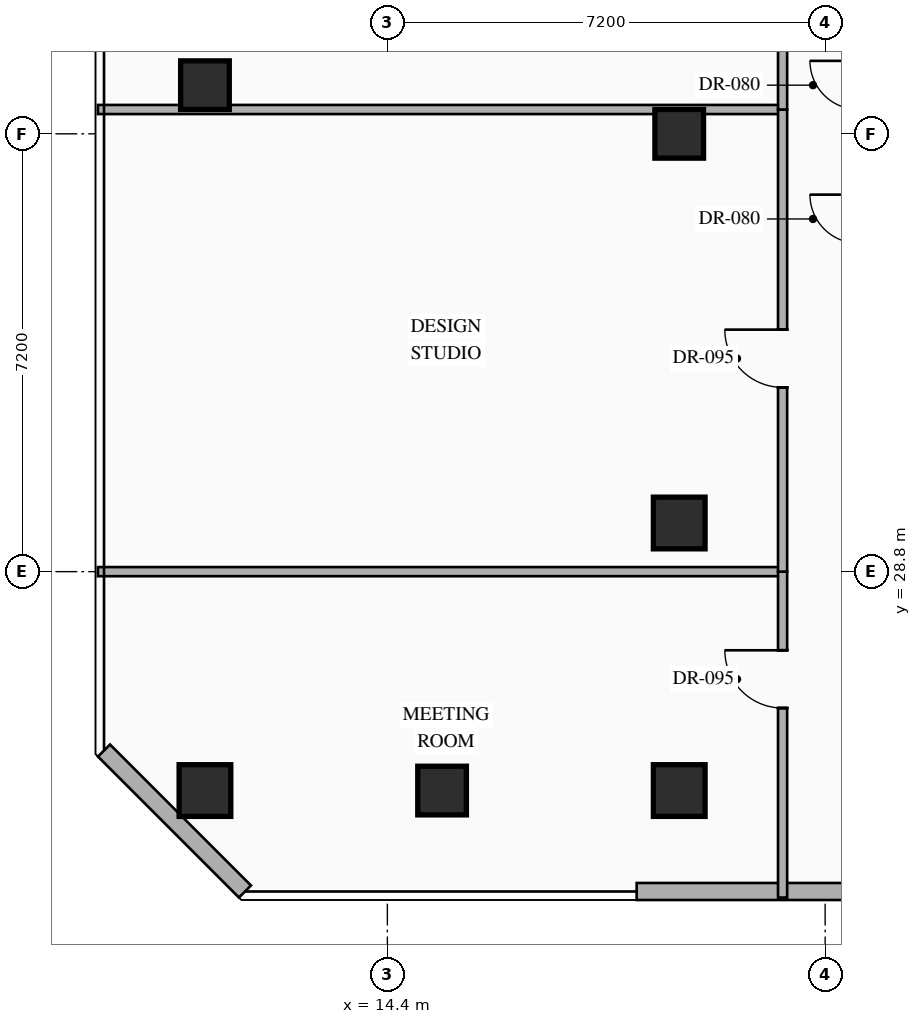
"""IFC4 building model, lengths in metres.
Left out: names, types, materials, properties, quantities, classifications, styles, units other than length and angle.
Written with IfcOpenShell. Run it as: python <this file> out.ifc"""

import sys

from ifc_helpers import new_model, si_unit, direction, frame, frame_2d, origin, origin_2d, place, context, subcontext, project, spatial, rectangle, hollow_rectangle, extrude, element, fill, save


model = new_model("IFC4")
c1 = context("Model", 3, precision=1e-05, world=origin(), true_north=direction((0.0, 1.0)))
c2 = subcontext(c1, "Body", "Model", "MODEL_VIEW")
j1 = project(units=[si_unit("LENGTHUNIT", "METRE"), si_unit("PLANEANGLEUNIT", "RADIAN")], contexts=[c1])
p1 = place(None, origin())
s1 = spatial("IfcSite", under=j1, at=p1, CompositionType="ELEMENT")
p2 = place(p1, origin())
s2 = spatial("IfcBuilding", under=s1, at=p2, CompositionType="ELEMENT")
p3 = place(p2, frame((0.0, 0.0, 142.05)))
s3 = spatial("IfcBuildingStorey", under=s2, at=p3, CompositionType="ELEMENT", Elevation=142.05)
for number, where, z_axis, x_axis in (
    (1, (11.4, 25.2, 0.0), (0.0, 0.0, 1.0), (1.0, 0.0, 0.0)),
    (2, (19.2, 25.2, 0.0), (0.0, 0.0, 1.0), (1.0, 0.0, 0.0)),
    (3, (19.2, 29.6, 0.0), (0.0, 0.0, 1.0), (1.0, 0.0, 0.0)),
):
    element("IfcColumn", number, at=place(p3, frame(where, z_axis=z_axis, x_axis=x_axis)), inside=s3, PredefinedType="COLUMN", context=c2, shape_type="SweptSolid", body=[
        extrude(hollow_rectangle(XDim=0.85, YDim=0.85, WallThickness=0.032, at=origin_2d()), origin(), (0.0, 0.0, 1.0), 3.6),
    ])
for number, where, z_axis, x_axis in (
    (4, (11.4, 36.8, 0.0), (0.0, 0.0, 1.0), (1.0, 0.0, 0.0)),
    (5, (19.2, 36.0, 0.0), (0.0, 0.0, 1.0), (1.0, 0.0, 0.0)),
    (6, (15.3, 25.2, 0.0), (0.0, 0.0, 1.0), (1.0, 0.0, 0.0)),
):
    element("IfcColumn", number, at=place(p3, frame(where, z_axis=z_axis, x_axis=x_axis)), inside=s3, PredefinedType="COLUMN", context=c2, shape_type="SweptSolid", body=[
        extrude(hollow_rectangle(XDim=0.8, YDim=0.8, WallThickness=0.032, at=origin_2d()), origin(), (0.0, 0.0, 1.0), 3.6),
    ])
p4 = place(p3, frame((25.247, 23.54, 0.0), z_axis=(0.0, 0.0, 1.0), x_axis=(-1.0, 0.0, 0.0)))
e7 = element("IfcWall", 7, at=p4, inside=s3, PredefinedType="STANDARD", context=c2, shape_type="SweptSolid", body=[
    extrude(rectangle(XDim=6.747, YDim=0.28, at=frame_2d((3.374, 0.0))), origin(), (0.0, 0.0, 1.0), 3.35),
])
p5 = place(p3, frame((12.058, 23.54, 0.0), z_axis=(0.0, 0.0, 1.0), x_axis=(-0.707144017911, 0.707069542501, 0.0)))
e8 = element("IfcWall", 8, at=p5, inside=s3, PredefinedType="STANDARD", context=c2, shape_type="SweptSolid", body=[
    extrude(rectangle(XDim=3.278, YDim=0.28, at=frame_2d((1.639, 0.0))), origin(), (0.0, 0.0, 1.0), 3.35),
])
p6 = place(p3, frame((9.64, 28.8, 0.0), z_axis=(0.0, 0.0, 1.0), x_axis=(1.0, 0.0, 0.0)))
e9 = element("IfcWall", 9, at=p6, inside=s3, PredefinedType="PARTITIONING", context=c2, shape_type="SweptSolid", body=[
    extrude(rectangle(XDim=11.26, YDim=0.15, at=frame_2d((5.63, 0.0))), origin(), (0.0, 0.0, 1.0), 3.35),
])
p7 = place(p3, frame((20.9, 23.44, 0.0), z_axis=(0.0, 0.0, 1.0), x_axis=(0.0, 1.0, 0.0)))
e10 = element("IfcWall", 10, at=p7, inside=s3, PredefinedType="PARTITIONING", context=c2, shape_type="SweptSolid", body=[
    extrude(rectangle(XDim=5.36, YDim=0.15, at=frame_2d((2.68, 0.0))), origin(), (0.0, 0.0, 1.0), 3.35),
])
p8 = place(p7, frame((3.117, 0.0, 0.0)))
e11 = element("IfcOpeningElement", 11, at=p8, cuts=e10, PredefinedType="OPENING", context=c2, shape_type="SweptSolid", body=[
    extrude(rectangle(XDim=0.95, YDim=2.15, at=frame_2d((0.475, 1.075))), frame((0.0, 0.085, 0.0), z_axis=(0.0, -1.0, 0.0), x_axis=(1.0, 0.0, 0.0)), (0.0, 0.0, 1.0), 0.17),
])
p9 = place(p3, frame((9.64, 36.4, 0.0), z_axis=(0.0, 0.0, 1.0), x_axis=(1.0, 0.0, 0.0)))
e12 = element("IfcWall", 12, at=p9, inside=s3, PredefinedType="PARTITIONING", context=c2, shape_type="SweptSolid", body=[
    extrude(rectangle(XDim=11.26, YDim=0.15, at=frame_2d((5.63, 0.0))), origin(), (0.0, 0.0, 1.0), 2.695),
])
p10 = place(p3, frame((20.9, 28.8, 0.0), z_axis=(0.0, 0.0, 1.0), x_axis=(0.0, 1.0, 0.0)))
e13 = element("IfcWall", 13, at=p10, inside=s3, PredefinedType="PARTITIONING", context=c2, shape_type="SweptSolid", body=[
    extrude(rectangle(XDim=7.6, YDim=0.15, at=frame_2d((3.8, 0.0))), origin(), (0.0, 0.0, 1.0), 3.35),
])
p11 = place(p10, frame((3.03, 0.0, 0.0)))
e14 = element("IfcOpeningElement", 14, at=p11, cuts=e13, PredefinedType="OPENING", context=c2, shape_type="SweptSolid", body=[
    extrude(rectangle(XDim=0.95, YDim=2.15, at=frame_2d((0.475, 1.075))), frame((0.0, 0.085, 0.0), z_axis=(0.0, -1.0, 0.0), x_axis=(1.0, 0.0, 0.0)), (0.0, 0.0, 1.0), 0.17),
])
p12 = place(p3, frame((20.9, 36.4, 0.0), z_axis=(0.0, 0.0, 1.0), x_axis=(0.0, 1.0, 0.0)))
e15 = element("IfcWall", 15, at=p12, inside=s3, PredefinedType="PARTITIONING", context=c2, shape_type="SweptSolid", body=[
    extrude(rectangle(XDim=7.6, YDim=0.15, at=frame_2d((3.8, 0.0))), origin(), (0.0, 0.0, 1.0), 3.35),
])
p13 = place(p12, frame((4.503, 0.0, 0.0)))
e16 = element("IfcOpeningElement", 16, at=p13, cuts=e15, PredefinedType="OPENING", context=c2, shape_type="SweptSolid", body=[
    extrude(rectangle(XDim=0.95, YDim=2.15, at=frame_2d((0.475, 1.075))), frame((0.0, 0.085, 0.0), z_axis=(0.0, -1.0, 0.0), x_axis=(1.0, 0.0, 0.0)), (0.0, 0.0, 1.0), 0.17),
])
p14 = place(p8, origin())
e17 = element("IfcDoor", 17, at=p14, inside=s3, OperationType="SINGLE_SWING_RIGHT", PredefinedType="DOOR", context=c2, shape_type="SweptSolid", body=[
    extrude(rectangle(XDim=0.95, YDim=2.15, at=frame_2d((0.475, 1.075))), frame((0.0, 0.025, 0.0), z_axis=(0.0, -1.0, 0.0), x_axis=(1.0, 0.0, 0.0)), (0.0, 0.0, 1.0), 0.05),
])
fill(e11, e17)
p15 = place(p11, origin())
e18 = element("IfcDoor", 18, at=p15, inside=s3, OperationType="SINGLE_SWING_RIGHT", PredefinedType="DOOR", context=c2, shape_type="SweptSolid", body=[
    extrude(rectangle(XDim=0.95, YDim=2.15, at=frame_2d((0.475, 1.075))), frame((0.0, 0.025, 0.0), z_axis=(0.0, -1.0, 0.0), x_axis=(1.0, 0.0, 0.0)), (0.0, 0.0, 1.0), 0.05),
])
fill(e14, e18)
save(model, sys.argv[1])
